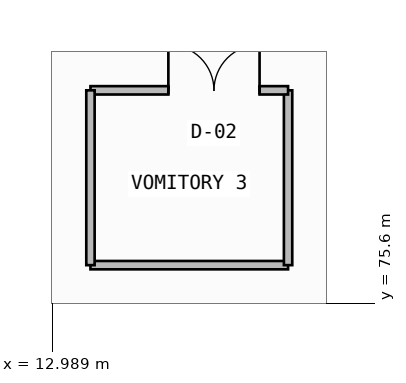
"""IFC4 building model, lengths in metres.
Left out: names, types, materials, properties, quantities, classifications, styles, units other than length and angle.
Written with IfcOpenShell. Run it as: python <this file> out.ifc"""

import sys

from ifc_helpers import new_model, si_unit, direction, frame, frame_2d, origin, place, context, subcontext, project, spatial, rectangle, extrude, element, fill, save


model = new_model("IFC4")
c1 = context("Model", 3, precision=1e-05, world=origin(), true_north=direction((0.0, 1.0)))
c2 = subcontext(c1, "Body", "Model", "MODEL_VIEW")
j1 = project(units=[si_unit("LENGTHUNIT", "METRE"), si_unit("PLANEANGLEUNIT", "RADIAN")], contexts=[c1])
p1 = place(None, origin())
s1 = spatial("IfcSite", under=j1, at=p1, CompositionType="ELEMENT")
p2 = place(p1, origin())
s2 = spatial("IfcBuilding", under=s1, at=p2, CompositionType="ELEMENT")
p3 = place(p2, frame((0.0, 0.0, 4.5)))
s3 = spatial("IfcBuildingStorey", under=s2, at=p3, CompositionType="ELEMENT", Elevation=4.5)
p4 = place(p3, frame((14.0, 76.6, 0.0), z_axis=(0.0, 0.0, 1.0), x_axis=(1.0, 0.0, 0.0)))
e1 = element("IfcWall", 1, at=p4, inside=s3, PredefinedType="SOLIDWALL", context=c2, shape_type="SweptSolid", body=[
    extrude(rectangle(XDim=5.2, YDim=0.22, at=frame_2d((2.6, 0.0))), origin(), (0.0, 0.0, 1.0), 3.665),
])
p5 = place(p3, frame((19.2, 76.6, 0.0), z_axis=(0.0, 0.0, 1.0), x_axis=(0.0, 1.0, 0.0)))
e2 = element("IfcWall", 2, at=p5, inside=s3, PredefinedType="SOLIDWALL", context=c2, shape_type="SweptSolid", body=[
    extrude(rectangle(XDim=4.6, YDim=0.22, at=frame_2d((2.3, 0.0))), origin(), (0.0, 0.0, 1.0), 3.665),
])
p6 = place(p3, frame((19.2, 81.2, 0.0), z_axis=(0.0, 0.0, 1.0), x_axis=(-1.0, 0.0, 0.0)))
e3 = element("IfcWall", 3, at=p6, inside=s3, PredefinedType="SOLIDWALL", context=c2, shape_type="SweptSolid", body=[
    extrude(rectangle(XDim=5.2, YDim=0.22, at=frame_2d((2.6, 0.0))), origin(), (0.0, 0.0, 1.0), 3.665),
])
p7 = place(p6, frame((0.75, 0.0, 0.0)))
e4 = element("IfcOpeningElement", 4, at=p7, cuts=e3, PredefinedType="OPENING", context=c2, shape_type="SweptSolid", body=[
    extrude(rectangle(XDim=2.4, YDim=2.4, at=frame_2d((1.2, 1.2))), frame((0.0, 0.12, 0.0), z_axis=(0.0, -1.0, 0.0), x_axis=(1.0, 0.0, 0.0)), (0.0, 0.0, 1.0), 0.24),
])
p8 = place(p3, frame((14.0, 81.2, 0.0), z_axis=(0.0, 0.0, 1.0), x_axis=(0.0, -1.0, 0.0)))
e5 = element("IfcWall", 5, at=p8, inside=s3, PredefinedType="SOLIDWALL", context=c2, shape_type="SweptSolid", body=[
    extrude(rectangle(XDim=4.6, YDim=0.22, at=frame_2d((2.3, 0.0))), origin(), (0.0, 0.0, 1.0), 4.18),
])
p9 = place(p7, frame((2.4, 0.0, 0.0), z_axis=(0.0, 0.0, 1.0), x_axis=(-1.0, 0.0, 0.0)))
e6 = element("IfcDoor", 6, at=p9, inside=s3, OperationType="DOUBLE_DOOR_SINGLE_SWING", PredefinedType="USERDEFINED", context=c2, shape_type="SweptSolid", body=[
    extrude(rectangle(XDim=2.4, YDim=2.4, at=frame_2d((1.2, 1.2))), frame((0.0, 0.025, 0.0), z_axis=(0.0, -1.0, 0.0), x_axis=(1.0, 0.0, 0.0)), (0.0, 0.0, 1.0), 0.05),
])
fill(e4, e6)
save(model, sys.argv[1])
